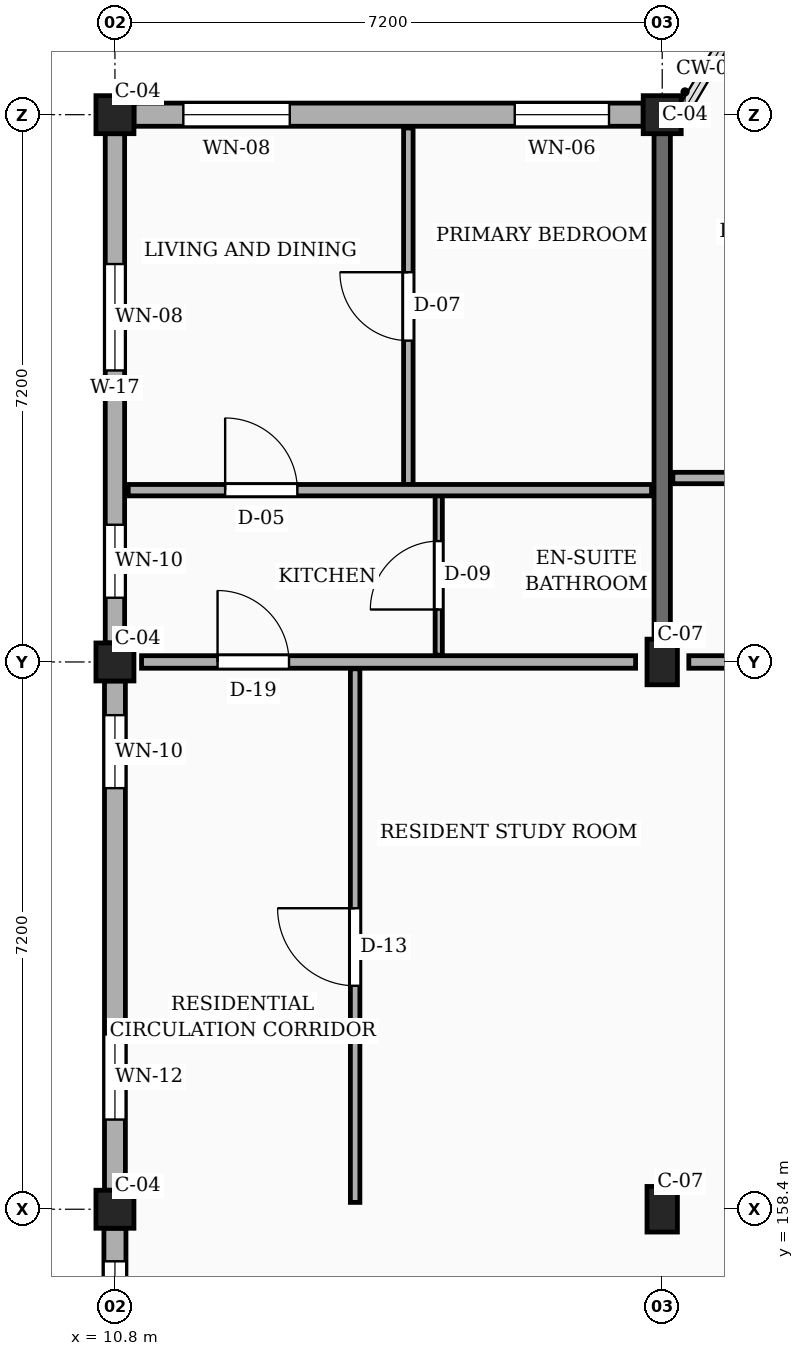
"""IFC4 building model, lengths in metres.
Left out: names, types, materials, properties, quantities, classifications, styles, units other than length and angle.
Written with IfcOpenShell. Run it as: python <this file> out.ifc"""

import sys

from ifc_helpers import new_model, si_unit, direction, frame, frame_2d, origin, origin_2d, place, context, subcontext, project, spatial, rectangle, extrude, element, fill, save


model = new_model("IFC4")
c1 = context("Model", 3, precision=1e-05, world=origin(), true_north=direction((0.0, 1.0)))
c2 = subcontext(c1, "Body", "Model", "MODEL_VIEW")
j1 = project(units=[si_unit("LENGTHUNIT", "METRE"), si_unit("PLANEANGLEUNIT", "RADIAN")], contexts=[c1])
p1 = place(None, origin())
s1 = spatial("IfcSite", under=j1, at=p1, CompositionType="ELEMENT")
p2 = place(p1, origin())
s2 = spatial("IfcBuilding", under=s1, at=p2, CompositionType="ELEMENT")
p3 = place(p2, frame((0.0, 0.0, 29.7)))
s3 = spatial("IfcBuildingStorey", under=s2, at=p3, CompositionType="ELEMENT", Elevation=29.7)
for number, where, z_axis, x_axis in (
    (1, (10.8, 158.4, 0.0), (0.0, 0.0, 1.0), (1.0, 0.0, 0.0)),
    (2, (10.8, 165.6, 0.0), (0.0, 0.0, 1.0), (1.0, 0.0, 0.0)),
    (3, (10.8, 172.8, 0.0), (0.0, 0.0, 1.0), (1.0, 0.0, 0.0)),
):
    element("IfcColumn", number, at=place(p3, frame(where, z_axis=z_axis, x_axis=x_axis)), inside=s3, PredefinedType="COLUMN", context=c2, shape_type="SweptSolid", body=[
        extrude(rectangle(XDim=0.5, YDim=0.5, at=origin_2d()), origin(), (0.0, 0.0, 1.0), 3.15),
    ])
for number, where, z_axis, x_axis in (
    (4, (18.0, 158.4, 0.0), (0.0, 0.0, 1.0), (1.0, 0.0, 0.0)),
    (5, (18.0, 165.6, 0.0), (0.0, 0.0, 1.0), (1.0, 0.0, 0.0)),
):
    element("IfcColumn", number, at=place(p3, frame(where, z_axis=z_axis, x_axis=x_axis)), inside=s3, PredefinedType="COLUMN", context=c2, shape_type="SweptSolid", body=[
        extrude(rectangle(XDim=0.4, YDim=0.6, at=origin_2d()), origin(), (0.0, 0.0, 1.0), 3.15),
    ])
p4 = place(p3, frame((18.0, 172.8, 0.0), z_axis=(0.0, 0.0, 1.0), x_axis=(1.0, 0.0, 0.0)))
e6 = element("IfcColumn", 6, at=p4, inside=s3, PredefinedType="COLUMN", context=c2, shape_type="SweptSolid", body=[
    extrude(rectangle(XDim=0.5, YDim=0.5, at=origin_2d()), origin(), (0.0, 0.0, 1.0), 3.15),
])
p5 = place(p3, frame((18.0, 165.9, 0.0), z_axis=(0.0, 0.0, 1.0), x_axis=(0.0, 1.0, 0.0)))
e7 = element("IfcWall", 7, at=p5, inside=s3, PredefinedType="SOLIDWALL", context=c2, shape_type="SweptSolid", body=[
    extrude(rectangle(XDim=6.65, YDim=0.215, at=frame_2d((3.325, 0.0))), origin(), (0.0, 0.0, 1.0), 2.185),
])
p6 = place(p3, frame((17.75, 172.8, 0.0), z_axis=(0.0, 0.0, 1.0), x_axis=(-1.0, 0.0, 0.0)))
e8 = element("IfcWall", 8, at=p6, inside=s3, PredefinedType="SOLIDWALL", context=c2, shape_type="SweptSolid", body=[
    extrude(rectangle(XDim=6.7, YDim=0.305, at=frame_2d((3.35, 0.0))), origin(), (0.0, 0.0, 1.0), 2.455),
])
p7 = place(p6, frame((0.45, 0.0, 0.78)))
e9 = element("IfcOpeningElement", 9, at=p7, cuts=e8, PredefinedType="OPENING", context=c2, shape_type="SweptSolid", body=[
    extrude(rectangle(XDim=1.24, YDim=1.15, at=frame_2d((0.62, 0.575))), frame((0.0, 0.163, 0.0), z_axis=(0.0, -1.0, 0.0), x_axis=(1.0, 0.0, 0.0)), (0.0, 0.0, 1.0), 0.325),
])
p8 = place(p6, frame((4.65, 0.0, 0.78)))
e10 = element("IfcOpeningElement", 10, at=p8, cuts=e8, PredefinedType="OPENING", context=c2, shape_type="SweptSolid", body=[
    extrude(rectangle(XDim=1.4, YDim=1.15, at=frame_2d((0.7, 0.575))), frame((0.0, 0.163, 0.0), z_axis=(0.0, -1.0, 0.0), x_axis=(1.0, 0.0, 0.0)), (0.0, 0.0, 1.0), 0.325),
])
p9 = place(p3, frame((10.8, 172.55, 0.0), z_axis=(0.0, 0.0, 1.0), x_axis=(0.0, -1.0, 0.0)))
e11 = element("IfcWall", 11, at=p9, inside=s3, PredefinedType="SOLIDWALL", context=c2, shape_type="SweptSolid", body=[
    extrude(rectangle(XDim=6.7, YDim=0.255, at=frame_2d((3.35, 0.0))), origin(), (0.0, 0.0, 1.0), 2.455),
])
p10 = place(p9, frame((1.715, 0.0, 0.78)))
e12 = element("IfcOpeningElement", 12, at=p10, cuts=e11, PredefinedType="OPENING", context=c2, shape_type="SweptSolid", body=[
    extrude(rectangle(XDim=1.4, YDim=1.15, at=frame_2d((0.7, 0.575))), frame((0.0, 0.137, 0.0), z_axis=(0.0, -1.0, 0.0), x_axis=(1.0, 0.0, 0.0)), (0.0, 0.0, 1.0), 0.275),
])
p11 = place(p9, frame((5.145, 0.0, 0.78)))
e13 = element("IfcOpeningElement", 13, at=p11, cuts=e11, PredefinedType="OPENING", context=c2, shape_type="SweptSolid", body=[
    extrude(rectangle(XDim=0.96, YDim=1.26, at=frame_2d((0.48, 0.63))), frame((0.0, 0.137, 0.0), z_axis=(0.0, -1.0, 0.0), x_axis=(1.0, 0.0, 0.0)), (0.0, 0.0, 1.0), 0.275),
])
p12 = place(p3, frame((10.8, 165.35, 0.0), z_axis=(0.0, 0.0, 1.0), x_axis=(0.0, -1.0, 0.0)))
e14 = element("IfcWall", 14, at=p12, inside=s3, PredefinedType="SOLIDWALL", context=c2, shape_type="SweptSolid", body=[
    extrude(rectangle(XDim=6.7, YDim=0.275, at=frame_2d((3.35, 0.0))), origin(), (0.0, 0.0, 1.0), 2.455),
])
p13 = place(p12, frame((0.45, 0.0, 0.78)))
e15 = element("IfcOpeningElement", 15, at=p13, cuts=e14, PredefinedType="OPENING", context=c2, shape_type="SweptSolid", body=[
    extrude(rectangle(XDim=0.96, YDim=1.26, at=frame_2d((0.48, 0.63))), frame((0.0, 0.147, 0.0), z_axis=(0.0, -1.0, 0.0), x_axis=(1.0, 0.0, 0.0)), (0.0, 0.0, 1.0), 0.295),
])
p14 = place(p12, frame((4.65, 0.0, 0.78)))
e16 = element("IfcOpeningElement", 16, at=p14, cuts=e14, PredefinedType="OPENING", context=c2, shape_type="SweptSolid", body=[
    extrude(rectangle(XDim=1.12, YDim=1.26, at=frame_2d((0.56, 0.63))), frame((0.0, 0.147, 0.0), z_axis=(0.0, -1.0, 0.0), x_axis=(1.0, 0.0, 0.0)), (0.0, 0.0, 1.0), 0.295),
])
p15 = place(p3, frame((10.8, 158.15, 0.0), z_axis=(0.0, 0.0, 1.0), x_axis=(0.0, -1.0, 0.0)))
e17 = element("IfcWall", 17, at=p15, inside=s3, PredefinedType="SOLIDWALL", context=c2, shape_type="SweptSolid", body=[
    extrude(rectangle(XDim=6.7, YDim=0.29, at=frame_2d((3.35, 0.0))), origin(), (0.0, 0.0, 1.0), 2.455),
])
p16 = place(p15, frame((0.435, 0.0, 0.78)))
e18 = element("IfcOpeningElement", 18, at=p16, cuts=e17, PredefinedType="OPENING", context=c2, shape_type="SweptSolid", body=[
    extrude(rectangle(XDim=1.12, YDim=1.26, at=frame_2d((0.56, 0.63))), frame((0.0, 0.155, 0.0), z_axis=(0.0, -1.0, 0.0), x_axis=(1.0, 0.0, 0.0)), (0.0, 0.0, 1.0), 0.31),
])
p17 = place(p15, frame((3.525, 0.0, 0.78)))
e19 = element("IfcOpeningElement", 19, at=p17, cuts=e17, PredefinedType="OPENING", context=c2, shape_type="SweptSolid", body=[
    extrude(rectangle(XDim=1.28, YDim=1.26, at=frame_2d((0.64, 0.63))), frame((0.0, 0.155, 0.0), z_axis=(0.0, -1.0, 0.0), x_axis=(1.0, 0.0, 0.0)), (0.0, 0.0, 1.0), 0.31),
])
p18 = place(p3, frame((11.15, 165.6, 0.0), z_axis=(0.0, 0.0, 1.0), x_axis=(1.0, 0.0, 0.0)))
e20 = element("IfcWall", 20, at=p18, inside=s3, PredefinedType="PARTITIONING", context=c2, shape_type="SweptSolid", body=[
    extrude(rectangle(XDim=6.5, YDim=0.165, at=frame_2d((3.25, 0.0))), origin(), (0.0, 0.0, 1.0), 2.32),
])
p19 = place(p18, frame((1.0, 0.0, 0.0)))
e21 = element("IfcOpeningElement", 21, at=p19, cuts=e20, PredefinedType="OPENING", context=c2, shape_type="SweptSolid", body=[
    extrude(rectangle(XDim=0.94, YDim=2.12, at=frame_2d((0.47, 1.06))), frame((0.0, 0.093, 0.0), z_axis=(0.0, -1.0, 0.0), x_axis=(1.0, 0.0, 0.0)), (0.0, 0.0, 1.0), 0.185),
])
p20 = place(p3, frame((18.35, 165.6, 0.0), z_axis=(0.0, 0.0, 1.0), x_axis=(1.0, 0.0, 0.0)))
e22 = element("IfcWall", 22, at=p20, inside=s3, PredefinedType="PARTITIONING", context=c2, shape_type="SweptSolid", body=[
    extrude(rectangle(XDim=6.5, YDim=0.165, at=frame_2d((3.25, 0.0))), origin(), (0.0, 0.0, 1.0), 2.32),
])
p21 = place(p20, frame((1.0, 0.0, 0.0)))
e23 = element("IfcOpeningElement", 23, at=p21, cuts=e22, PredefinedType="OPENING", context=c2, shape_type="SweptSolid", body=[
    extrude(rectangle(XDim=1.14, YDim=2.18, at=frame_2d((0.57, 1.09))), frame((0.0, 0.093, 0.0), z_axis=(0.0, -1.0, 0.0), x_axis=(1.0, 0.0, 0.0)), (0.0, 0.0, 1.0), 0.185),
])
p22 = place(p3, frame((13.96, 158.49, 0.0), z_axis=(0.0, 0.0, 1.0), x_axis=(0.0, 1.0, 0.0)))
e24 = element("IfcWall", 24, at=p22, inside=s3, PredefinedType="PARTITIONING", context=c2, shape_type="SweptSolid", body=[
    extrude(rectangle(XDim=7.02, YDim=0.125, at=frame_2d((3.51, 0.0))), origin(), (0.0, 0.0, 1.0), 2.32),
])
p23 = place(p22, frame((2.85, 0.0, 0.0)))
e25 = element("IfcOpeningElement", 25, at=p23, cuts=e24, PredefinedType="OPENING", context=c2, shape_type="SweptSolid", body=[
    extrude(rectangle(XDim=1.02, YDim=2.15, at=frame_2d((0.51, 1.075))), frame((0.0, 0.073, 0.0), z_axis=(0.0, -1.0, 0.0), x_axis=(1.0, 0.0, 0.0)), (0.0, 0.0, 1.0), 0.145),
])
p24 = place(p3, frame((14.66, 167.93, 0.0), z_axis=(0.0, 0.0, 1.0), x_axis=(0.0, 1.0, 0.0)))
e26 = element("IfcWall", 26, at=p24, inside=s3, PredefinedType="PARTITIONING", context=c2, shape_type="SweptSolid", body=[
    extrude(rectangle(XDim=4.695, YDim=0.125, at=frame_2d((2.348, 0.0))), origin(), (0.0, 0.0, 1.0), 2.32),
])
p25 = place(p24, frame((1.897, 0.0, 0.0)))
e27 = element("IfcOpeningElement", 27, at=p25, cuts=e26, PredefinedType="OPENING", context=c2, shape_type="SweptSolid", body=[
    extrude(rectangle(XDim=0.9, YDim=2.1, at=frame_2d((0.45, 1.05))), frame((0.0, 0.073, 0.0), z_axis=(0.0, -1.0, 0.0), x_axis=(1.0, 0.0, 0.0)), (0.0, 0.0, 1.0), 0.145),
])
p26 = place(p3, frame((15.06, 165.69, 0.0), z_axis=(0.0, 0.0, 1.0), x_axis=(0.0, 1.0, 0.0)))
e28 = element("IfcWall", 28, at=p26, inside=s3, PredefinedType="PARTITIONING", context=c2, shape_type="SweptSolid", body=[
    extrude(rectangle(XDim=2.1, YDim=0.095, at=frame_2d((1.05, 0.0))), origin(), (0.0, 0.0, 1.0), 2.32),
])
p27 = place(p26, frame((0.6, 0.0, 0.0)))
e29 = element("IfcOpeningElement", 29, at=p27, cuts=e28, PredefinedType="OPENING", context=c2, shape_type="SweptSolid", body=[
    extrude(rectangle(XDim=0.9, YDim=2.05, at=frame_2d((0.45, 1.025))), frame((0.0, 0.058, 0.0), z_axis=(0.0, -1.0, 0.0), x_axis=(1.0, 0.0, 0.0)), (0.0, 0.0, 1.0), 0.115),
])
p28 = place(p3, frame((10.975, 167.86, 0.0), z_axis=(0.0, 0.0, 1.0), x_axis=(1.0, 0.0, 0.0)))
e30 = element("IfcWall", 30, at=p28, inside=s3, PredefinedType="PARTITIONING", context=c2, shape_type="SweptSolid", body=[
    extrude(rectangle(XDim=6.885, YDim=0.15, at=frame_2d((3.442, 0.0))), origin(), (0.0, 0.0, 1.0), 2.32),
])
p29 = place(p28, frame((1.275, 0.0, 0.0)))
e31 = element("IfcOpeningElement", 31, at=p29, cuts=e30, PredefinedType="OPENING", context=c2, shape_type="SweptSolid", body=[
    extrude(rectangle(XDim=0.95, YDim=2.1, at=frame_2d((0.475, 1.05))), frame((0.0, 0.085, 0.0), z_axis=(0.0, -1.0, 0.0), x_axis=(1.0, 0.0, 0.0)), (0.0, 0.0, 1.0), 0.17),
])
p30 = place(p3, frame((18.14, 168.02, 0.0), z_axis=(0.0, 0.0, 1.0), x_axis=(1.0, 0.0, 0.0)))
e32 = element("IfcWall", 32, at=p30, inside=s3, PredefinedType="PARTITIONING", context=c2, shape_type="SweptSolid", body=[
    extrude(rectangle(XDim=6.92, YDim=0.15, at=frame_2d((3.46, 0.0))), origin(), (0.0, 0.0, 1.0), 2.32),
])
p31 = place(p30, frame((1.31, 0.0, 0.0)))
e33 = element("IfcOpeningElement", 33, at=p31, cuts=e32, PredefinedType="OPENING", context=c2, shape_type="SweptSolid", body=[
    extrude(rectangle(XDim=0.92, YDim=2.1, at=frame_2d((0.46, 1.05))), frame((0.0, 0.085, 0.0), z_axis=(0.0, -1.0, 0.0), x_axis=(1.0, 0.0, 0.0)), (0.0, 0.0, 1.0), 0.17),
])
p32 = place(p7, origin())
e34 = element("IfcWindow", 34, at=p32, inside=s3, PartitioningType="SINGLE_PANEL", PredefinedType="WINDOW", context=c2, shape_type="SweptSolid", body=[
    extrude(rectangle(XDim=1.24, YDim=1.15, at=frame_2d((0.62, 0.575))), frame((0.0, 0.03, 0.0), z_axis=(0.0, -1.0, 0.0), x_axis=(1.0, 0.0, 0.0)), (0.0, 0.0, 1.0), 0.06),
])
fill(e9, e34)
p33 = place(p8, origin())
e35 = element("IfcWindow", 35, at=p33, inside=s3, PartitioningType="SINGLE_PANEL", PredefinedType="WINDOW", context=c2, shape_type="SweptSolid", body=[
    extrude(rectangle(XDim=1.4, YDim=1.15, at=frame_2d((0.7, 0.575))), frame((0.0, 0.03, 0.0), z_axis=(0.0, -1.0, 0.0), x_axis=(1.0, 0.0, 0.0)), (0.0, 0.0, 1.0), 0.06),
])
fill(e10, e35)
p34 = place(p10, origin())
e36 = element("IfcWindow", 36, at=p34, inside=s3, PartitioningType="SINGLE_PANEL", PredefinedType="WINDOW", context=c2, shape_type="SweptSolid", body=[
    extrude(rectangle(XDim=1.4, YDim=1.15, at=frame_2d((0.7, 0.575))), frame((0.0, 0.03, 0.0), z_axis=(0.0, -1.0, 0.0), x_axis=(1.0, 0.0, 0.0)), (0.0, 0.0, 1.0), 0.06),
])
fill(e12, e36)
p35 = place(p11, origin())
e37 = element("IfcWindow", 37, at=p35, inside=s3, PartitioningType="SINGLE_PANEL", PredefinedType="WINDOW", context=c2, shape_type="SweptSolid", body=[
    extrude(rectangle(XDim=0.96, YDim=1.26, at=frame_2d((0.48, 0.63))), frame((0.0, 0.03, 0.0), z_axis=(0.0, -1.0, 0.0), x_axis=(1.0, 0.0, 0.0)), (0.0, 0.0, 1.0), 0.06),
])
fill(e13, e37)
p36 = place(p13, origin())
e38 = element("IfcWindow", 38, at=p36, inside=s3, PartitioningType="SINGLE_PANEL", PredefinedType="WINDOW", context=c2, shape_type="SweptSolid", body=[
    extrude(rectangle(XDim=0.96, YDim=1.26, at=frame_2d((0.48, 0.63))), frame((0.0, 0.03, 0.0), z_axis=(0.0, -1.0, 0.0), x_axis=(1.0, 0.0, 0.0)), (0.0, 0.0, 1.0), 0.06),
])
fill(e15, e38)
p37 = place(p14, origin())
e39 = element("IfcWindow", 39, at=p37, inside=s3, PartitioningType="SINGLE_PANEL", PredefinedType="WINDOW", context=c2, shape_type="SweptSolid", body=[
    extrude(rectangle(XDim=1.12, YDim=1.26, at=frame_2d((0.56, 0.63))), frame((0.0, 0.03, 0.0), z_axis=(0.0, -1.0, 0.0), x_axis=(1.0, 0.0, 0.0)), (0.0, 0.0, 1.0), 0.06),
])
fill(e16, e39)
p38 = place(p16, origin())
e40 = element("IfcWindow", 40, at=p38, inside=s3, PartitioningType="SINGLE_PANEL", PredefinedType="WINDOW", context=c2, shape_type="SweptSolid", body=[
    extrude(rectangle(XDim=1.12, YDim=1.26, at=frame_2d((0.56, 0.63))), frame((0.0, 0.03, 0.0), z_axis=(0.0, -1.0, 0.0), x_axis=(1.0, 0.0, 0.0)), (0.0, 0.0, 1.0), 0.06),
])
fill(e18, e40)
p39 = place(p19, origin())
e41 = element("IfcDoor", 41, at=p39, inside=s3, OperationType="SINGLE_SWING_LEFT", PredefinedType="DOOR", context=c2, shape_type="SweptSolid", body=[
    extrude(rectangle(XDim=0.94, YDim=2.12, at=frame_2d((0.47, 1.06))), frame((0.0, 0.025, 0.0), z_axis=(0.0, -1.0, 0.0), x_axis=(1.0, 0.0, 0.0)), (0.0, 0.0, 1.0), 0.05),
])
fill(e21, e41)
p40 = place(p23, origin())
e42 = element("IfcDoor", 42, at=p40, inside=s3, OperationType="SINGLE_SWING_RIGHT", PredefinedType="DOOR", context=c2, shape_type="SweptSolid", body=[
    extrude(rectangle(XDim=1.02, YDim=2.15, at=frame_2d((0.51, 1.075))), frame((0.0, 0.025, 0.0), z_axis=(0.0, -1.0, 0.0), x_axis=(1.0, 0.0, 0.0)), (0.0, 0.0, 1.0), 0.05),
])
fill(e25, e42)
p41 = place(p25, origin())
e43 = element("IfcDoor", 43, at=p41, inside=s3, OperationType="SINGLE_SWING_RIGHT", PredefinedType="DOOR", context=c2, shape_type="SweptSolid", body=[
    extrude(rectangle(XDim=0.9, YDim=2.1, at=frame_2d((0.45, 1.05))), frame((0.0, 0.025, 0.0), z_axis=(0.0, -1.0, 0.0), x_axis=(1.0, 0.0, 0.0)), (0.0, 0.0, 1.0), 0.05),
])
fill(e27, e43)
p42 = place(p27, origin())
e44 = element("IfcDoor", 44, at=p42, inside=s3, OperationType="SINGLE_SWING_LEFT", PredefinedType="DOOR", context=c2, shape_type="SweptSolid", body=[
    extrude(rectangle(XDim=0.9, YDim=2.05, at=frame_2d((0.45, 1.025))), frame((0.0, 0.025, 0.0), z_axis=(0.0, -1.0, 0.0), x_axis=(1.0, 0.0, 0.0)), (0.0, 0.0, 1.0), 0.05),
])
fill(e29, e44)
p43 = place(p29, origin())
e45 = element("IfcDoor", 45, at=p43, inside=s3, OperationType="SINGLE_SWING_LEFT", PredefinedType="DOOR", context=c2, shape_type="SweptSolid", body=[
    extrude(rectangle(XDim=0.95, YDim=2.1, at=frame_2d((0.475, 1.05))), frame((0.0, 0.025, 0.0), z_axis=(0.0, -1.0, 0.0), x_axis=(1.0, 0.0, 0.0)), (0.0, 0.0, 1.0), 0.05),
])
fill(e31, e45)
save(model, sys.argv[1])
